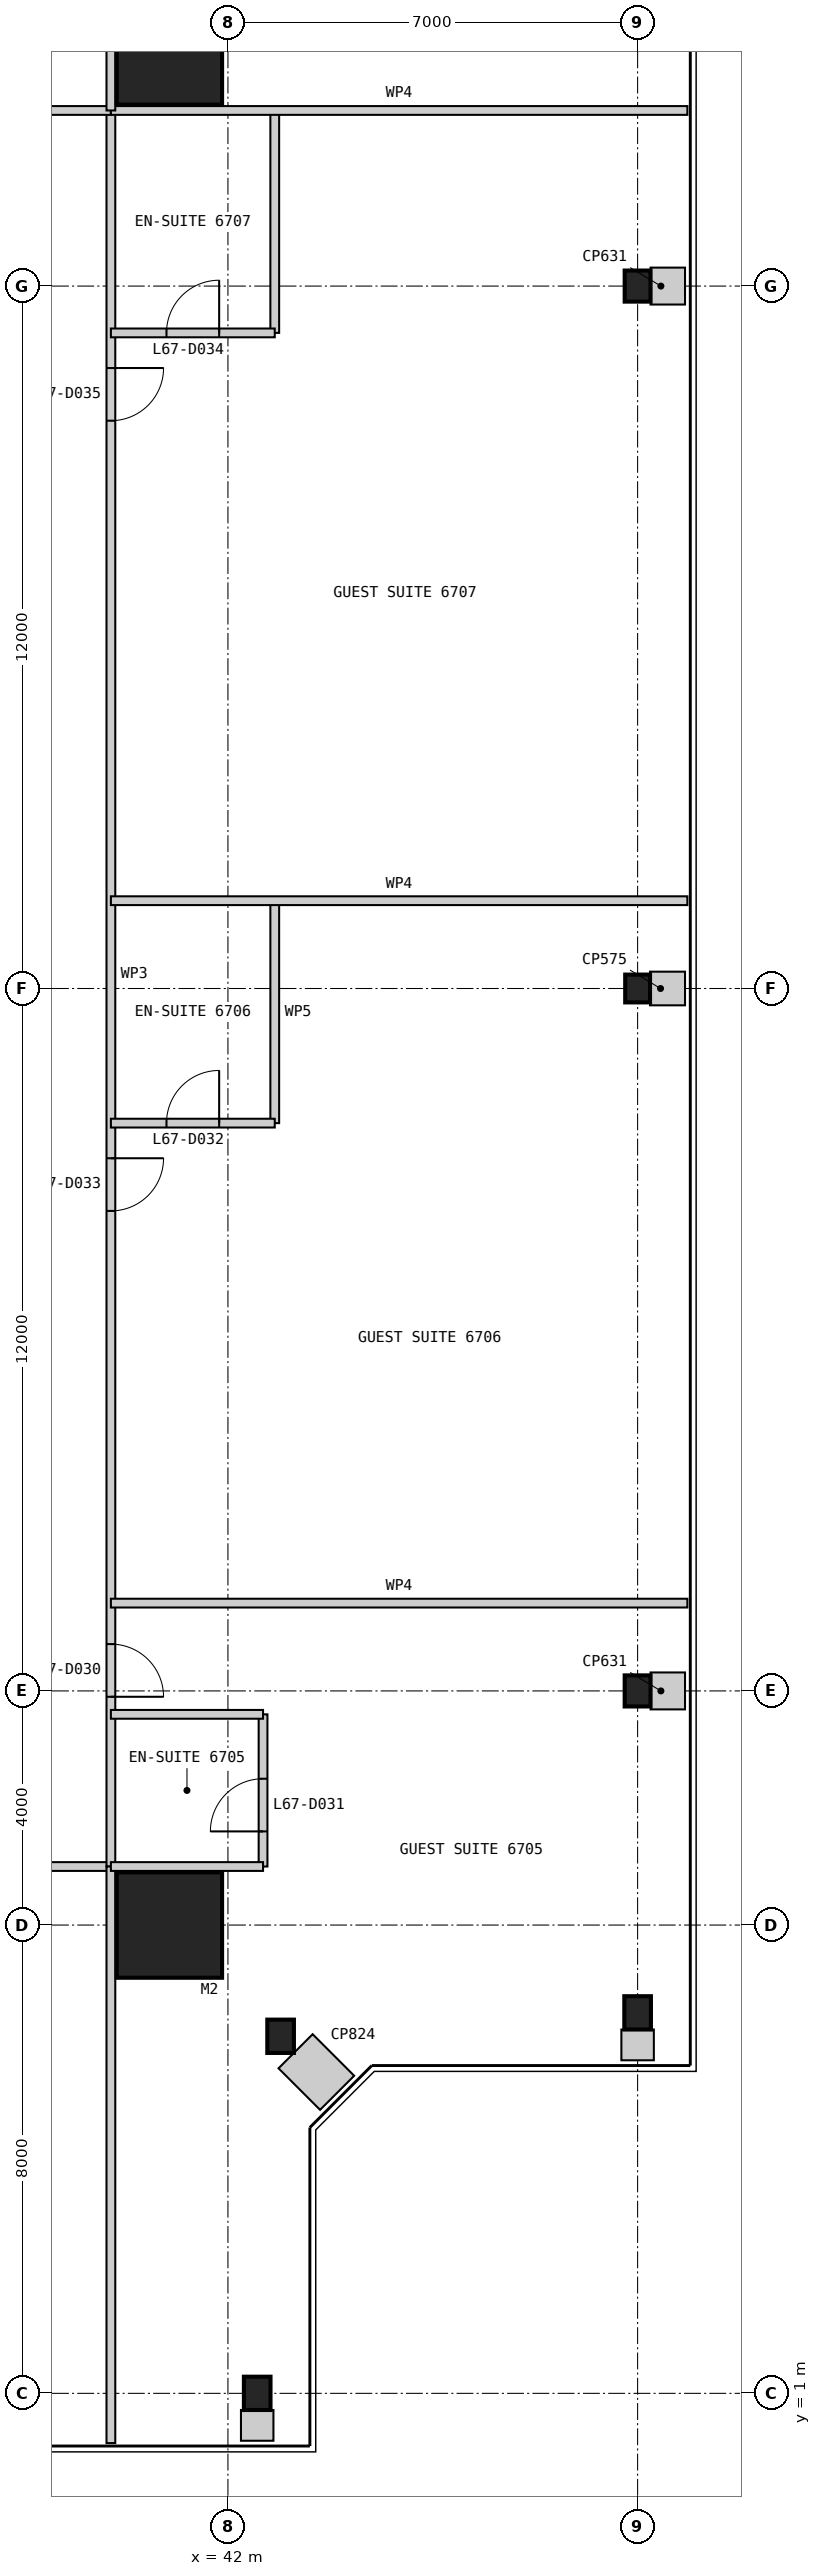
"""IFC4 building model, lengths in metres.
Left out: names, types, materials, properties, quantities, classifications, styles, units other than length and angle.
Written with IfcOpenShell. Run it as: python <this file> out.ifc"""

import sys

from ifc_helpers import new_model, si_unit, direction, frame, frame_2d, origin, origin_2d, place, context, subcontext, project, spatial, rectangle, i_section, extrude, element, fill, save


model = new_model("IFC4")
c1 = context("Model", 3, precision=1e-05, world=origin(), true_north=direction((0.0, 1.0)))
c2 = subcontext(c1, "Body", "Model", "MODEL_VIEW")
j1 = project(units=[si_unit("LENGTHUNIT", "METRE"), si_unit("PLANEANGLEUNIT", "RADIAN")], contexts=[c1])
p1 = place(None, origin())
s1 = spatial("IfcSite", under=j1, at=p1, CompositionType="ELEMENT")
p2 = place(p1, origin())
s2 = spatial("IfcBuilding", under=s1, at=p2, CompositionType="ELEMENT")
p3 = place(p2, frame((0.0, 0.0, 279.8)))
s3 = spatial("IfcBuildingStorey", under=s2, at=p3, CompositionType="ELEMENT", Elevation=279.8)
for number, where, z_axis, x_axis in (
    (1, (41.0, 9.0, 0.0), (0.0, 0.0, 1.0), (1.0, 0.0, 0.0)),
    (2, (41.0, 41.0, 0.0), (0.0, 0.0, 1.0), (1.0, 0.0, 0.0)),
):
    element("IfcColumn", number, at=place(p3, frame(where, z_axis=z_axis, x_axis=x_axis)), inside=s3, PredefinedType="COLUMN", context=c2, shape_type="SweptSolid", body=[
        extrude(rectangle(XDim=1.8, YDim=1.8, at=origin_2d()), origin(), (0.0, 0.0, 1.0), 3.4),
    ])
for number, where, z_axis, x_axis in (
    (3, (42.5, 1.0, 0.0), (0.0, 0.0, 1.0), (1.0, 0.0, 0.0)),
    (4, (42.9, 7.1, 0.0), (0.0, 0.0, 1.0), (1.0, 0.0, 0.0)),
    (5, (49.0, 7.5, 0.0), (0.0, 0.0, 1.0), (1.0, 0.0, 0.0)),
):
    element("IfcColumn", number, at=place(p3, frame(where, z_axis=z_axis, x_axis=x_axis)), inside=s3, PredefinedType="COLUMN", context=c2, shape_type="SweptSolid", body=[
        extrude(i_section(OverallWidth=0.455, OverallDepth=0.569, WebThickness=0.078, FlangeThickness=0.125, at=origin_2d()), origin(), (0.0, 0.0, 1.0), 3.4),
    ])
p4 = place(p3, frame((49.0, 13.0, 0.0), z_axis=(0.0, 0.0, 1.0), x_axis=(1.0, 0.0, 0.0)))
e6 = element("IfcColumn", 6, at=p4, inside=s3, PredefinedType="COLUMN", context=c2, shape_type="SweptSolid", body=[
    extrude(i_section(OverallWidth=0.442, OverallDepth=0.531, WebThickness=0.066, FlangeThickness=0.106, at=origin_2d()), origin(), (0.0, 0.0, 1.0), 3.4),
])
p5 = place(p3, frame((49.0, 25.0, 0.0), z_axis=(0.0, 0.0, 1.0), x_axis=(1.0, 0.0, 0.0)))
e7 = element("IfcColumn", 7, at=p5, inside=s3, PredefinedType="COLUMN", context=c2, shape_type="SweptSolid", body=[
    extrude(i_section(OverallWidth=0.424, OverallDepth=0.475, WebThickness=0.048, FlangeThickness=0.077, at=origin_2d()), origin(), (0.0, 0.0, 1.0), 3.4),
])
p6 = place(p3, frame((49.0, 37.0, 0.0), z_axis=(0.0, 0.0, 1.0), x_axis=(1.0, 0.0, 0.0)))
e8 = element("IfcColumn", 8, at=p6, inside=s3, PredefinedType="COLUMN", context=c2, shape_type="SweptSolid", body=[
    extrude(i_section(OverallWidth=0.442, OverallDepth=0.531, WebThickness=0.066, FlangeThickness=0.106, at=origin_2d()), origin(), (0.0, 0.0, 1.0), 3.4),
])
p7 = place(p3, frame((10.0, 10.0, 0.0), z_axis=(0.0, 0.0, 1.0), x_axis=(1.0, 0.0, 0.0)))
e9 = element("IfcWall", 9, at=p7, inside=s3, PredefinedType="PARTITIONING", context=c2, shape_type="SweptSolid", body=[
    extrude(rectangle(XDim=30.0, YDim=0.15, at=frame_2d((15.0, 0.0))), origin(), (0.0, 0.0, 1.0), 3.25),
])
p8 = place(p7, frame((2.9, 0.0, 0.0)))
e10 = element("IfcOpeningElement", 10, at=p8, cuts=e9, PredefinedType="OPENING", context=c2, shape_type="SweptSolid", body=[
    extrude(rectangle(XDim=0.9, YDim=2.1, at=frame_2d((0.45, 1.05))), frame((0.0, 0.085, 0.0), z_axis=(0.0, -1.0, 0.0), x_axis=(1.0, 0.0, 0.0)), (0.0, 0.0, 1.0), 0.17),
])
p9 = place(p7, frame((11.2, 0.0, 0.0)))
e11 = element("IfcOpeningElement", 11, at=p9, cuts=e9, PredefinedType="OPENING", context=c2, shape_type="SweptSolid", body=[
    extrude(rectangle(XDim=0.9, YDim=2.1, at=frame_2d((0.45, 1.05))), frame((0.0, 0.085, 0.0), z_axis=(0.0, -1.0, 0.0), x_axis=(1.0, 0.0, 0.0)), (0.0, 0.0, 1.0), 0.17),
])
p10 = place(p7, frame((17.6, 0.0, 0.0)))
e12 = element("IfcOpeningElement", 12, at=p10, cuts=e9, PredefinedType="OPENING", context=c2, shape_type="SweptSolid", body=[
    extrude(rectangle(XDim=0.9, YDim=2.1, at=frame_2d((0.45, 1.05))), frame((0.0, 0.085, 0.0), z_axis=(0.0, -1.0, 0.0), x_axis=(1.0, 0.0, 0.0)), (0.0, 0.0, 1.0), 0.17),
])
p11 = place(p7, frame((26.3, 0.0, 0.0)))
e13 = element("IfcOpeningElement", 13, at=p11, cuts=e9, PredefinedType="OPENING", context=c2, shape_type="SweptSolid", body=[
    extrude(rectangle(XDim=1.0, YDim=2.1, at=frame_2d((0.5, 1.05))), frame((0.0, 0.085, 0.0), z_axis=(0.0, -1.0, 0.0), x_axis=(1.0, 0.0, 0.0)), (0.0, 0.0, 1.0), 0.17),
])
p12 = place(p3, frame((40.0, 10.0, 0.0), z_axis=(0.0, 0.0, 1.0), x_axis=(0.0, 1.0, 0.0)))
e14 = element("IfcWall", 14, at=p12, inside=s3, PredefinedType="PARTITIONING", context=c2, shape_type="SweptSolid", body=[
    extrude(rectangle(XDim=30.0, YDim=0.15, at=frame_2d((15.0, 0.0))), origin(), (0.0, 0.0, 1.0), 2.638),
])
p13 = place(p12, frame((2.9, 0.0, 0.0)))
e15 = element("IfcOpeningElement", 15, at=p13, cuts=e14, PredefinedType="OPENING", context=c2, shape_type="SweptSolid", body=[
    extrude(rectangle(XDim=0.9, YDim=2.1, at=frame_2d((0.45, 1.05))), frame((0.0, 0.085, 0.0), z_axis=(0.0, -1.0, 0.0), x_axis=(1.0, 0.0, 0.0)), (0.0, 0.0, 1.0), 0.17),
])
p14 = place(p12, frame((11.2, 0.0, 0.0)))
e16 = element("IfcOpeningElement", 16, at=p14, cuts=e14, PredefinedType="OPENING", context=c2, shape_type="SweptSolid", body=[
    extrude(rectangle(XDim=0.9, YDim=2.1, at=frame_2d((0.45, 1.05))), frame((0.0, 0.085, 0.0), z_axis=(0.0, -1.0, 0.0), x_axis=(1.0, 0.0, 0.0)), (0.0, 0.0, 1.0), 0.17),
])
p15 = place(p12, frame((24.7, 0.0, 0.0)))
e17 = element("IfcOpeningElement", 17, at=p15, cuts=e14, PredefinedType="OPENING", context=c2, shape_type="SweptSolid", body=[
    extrude(rectangle(XDim=0.9, YDim=2.1, at=frame_2d((0.45, 1.05))), frame((0.0, 0.085, 0.0), z_axis=(0.0, -1.0, 0.0), x_axis=(1.0, 0.0, 0.0)), (0.0, 0.0, 1.0), 0.17),
])
p16 = place(p3, frame((40.0, 0.15, 0.0), z_axis=(0.0, 0.0, 1.0), x_axis=(0.0, 1.0, 0.0)))
e18 = element("IfcWall", 18, at=p16, inside=s3, PredefinedType="PARTITIONING", context=c2, shape_type="SweptSolid", body=[
    extrude(rectangle(XDim=9.85, YDim=0.15, at=frame_2d((4.925, 0.0))), origin(), (0.0, 0.0, 1.0), 3.25),
])
p17 = place(p3, frame((42.6, 10.0, 0.0), z_axis=(0.0, 0.0, 1.0), x_axis=(0.0, 1.0, 0.0)))
e19 = element("IfcWall", 19, at=p17, inside=s3, PredefinedType="PARTITIONING", context=c2, shape_type="SweptSolid", body=[
    extrude(rectangle(XDim=2.6, YDim=0.15, at=frame_2d((1.3, 0.0))), origin(), (0.0, 0.0, 1.0), 3.25),
])
p18 = place(p17, frame((0.6, 0.0, 0.0)))
e20 = element("IfcOpeningElement", 20, at=p18, cuts=e19, PredefinedType="OPENING", context=c2, shape_type="SweptSolid", body=[
    extrude(rectangle(XDim=0.9, YDim=2.1, at=frame_2d((0.45, 1.05))), frame((0.0, 0.085, 0.0), z_axis=(0.0, -1.0, 0.0), x_axis=(1.0, 0.0, 0.0)), (0.0, 0.0, 1.0), 0.17),
])
for number, where, z_axis, x_axis in (
    (21, (42.6, 10.0, 0.0), (0.0, 0.0, 1.0), (-1.0, 0.0, 0.0)),
    (22, (42.6, 12.6, 0.0), (0.0, 0.0, 1.0), (-1.0, 0.0, 0.0)),
):
    element("IfcWall", number, at=place(p3, frame(where, z_axis=z_axis, x_axis=x_axis)), inside=s3, PredefinedType="PARTITIONING", context=c2, shape_type="SweptSolid", body=[
        extrude(rectangle(XDim=2.6, YDim=0.15, at=frame_2d((1.3, 0.0))), origin(), (0.0, 0.0, 1.0), 3.25),
    ])
p19 = place(p3, frame((49.85, 14.5, 0.0), z_axis=(0.0, 0.0, 1.0), x_axis=(-1.0, 0.0, 0.0)))
e23 = element("IfcWall", 23, at=p19, inside=s3, PredefinedType="PARTITIONING", context=c2, shape_type="SweptSolid", body=[
    extrude(rectangle(XDim=9.85, YDim=0.15, at=frame_2d((4.925, 0.0))), origin(), (0.0, 0.0, 1.0), 3.25),
])
p20 = place(p3, frame((42.8, 22.7, 0.0), z_axis=(0.0, 0.0, 1.0), x_axis=(0.0, 1.0, 0.0)))
e24 = element("IfcWall", 24, at=p20, inside=s3, PredefinedType="PARTITIONING", context=c2, shape_type="SweptSolid", body=[
    extrude(rectangle(XDim=3.8, YDim=0.15, at=frame_2d((1.9, 0.0))), origin(), (0.0, 0.0, 1.0), 3.25),
])
p21 = place(p3, frame((42.8, 22.7, 0.0), z_axis=(0.0, 0.0, 1.0), x_axis=(-1.0, 0.0, 0.0)))
e25 = element("IfcWall", 25, at=p21, inside=s3, PredefinedType="PARTITIONING", context=c2, shape_type="SweptSolid", body=[
    extrude(rectangle(XDim=2.8, YDim=0.15, at=frame_2d((1.4, 0.0))), origin(), (0.0, 0.0, 1.0), 3.25),
])
p22 = place(p21, frame((0.95, 0.0, 0.0)))
e26 = element("IfcOpeningElement", 26, at=p22, cuts=e25, PredefinedType="OPENING", context=c2, shape_type="SweptSolid", body=[
    extrude(rectangle(XDim=0.9, YDim=2.1, at=frame_2d((0.45, 1.05))), frame((0.0, 0.085, 0.0), z_axis=(0.0, -1.0, 0.0), x_axis=(1.0, 0.0, 0.0)), (0.0, 0.0, 1.0), 0.17),
])
p23 = place(p3, frame((49.85, 26.5, 0.0), z_axis=(0.0, 0.0, 1.0), x_axis=(-1.0, 0.0, 0.0)))
e27 = element("IfcWall", 27, at=p23, inside=s3, PredefinedType="PARTITIONING", context=c2, shape_type="SweptSolid", body=[
    extrude(rectangle(XDim=9.85, YDim=0.15, at=frame_2d((4.925, 0.0))), origin(), (0.0, 0.0, 1.0), 3.25),
])
p24 = place(p3, frame((42.8, 36.2, 0.0), z_axis=(0.0, 0.0, 1.0), x_axis=(0.0, 1.0, 0.0)))
e28 = element("IfcWall", 28, at=p24, inside=s3, PredefinedType="PARTITIONING", context=c2, shape_type="SweptSolid", body=[
    extrude(rectangle(XDim=3.8, YDim=0.15, at=frame_2d((1.9, 0.0))), origin(), (0.0, 0.0, 1.0), 3.25),
])
p25 = place(p3, frame((42.8, 36.2, 0.0), z_axis=(0.0, 0.0, 1.0), x_axis=(-1.0, 0.0, 0.0)))
e29 = element("IfcWall", 29, at=p25, inside=s3, PredefinedType="PARTITIONING", context=c2, shape_type="SweptSolid", body=[
    extrude(rectangle(XDim=2.8, YDim=0.15, at=frame_2d((1.4, 0.0))), origin(), (0.0, 0.0, 1.0), 3.25),
])
p26 = place(p25, frame((0.95, 0.0, 0.0)))
e30 = element("IfcOpeningElement", 30, at=p26, cuts=e29, PredefinedType="OPENING", context=c2, shape_type="SweptSolid", body=[
    extrude(rectangle(XDim=0.9, YDim=2.1, at=frame_2d((0.45, 1.05))), frame((0.0, 0.085, 0.0), z_axis=(0.0, -1.0, 0.0), x_axis=(1.0, 0.0, 0.0)), (0.0, 0.0, 1.0), 0.17),
])
p27 = place(p3, frame((40.0, 40.0, 0.0), z_axis=(0.0, 0.0, 1.0), x_axis=(-1.0, 0.0, 0.0)))
e31 = element("IfcWall", 31, at=p27, inside=s3, PredefinedType="PARTITIONING", context=c2, shape_type="SweptSolid", body=[
    extrude(rectangle(XDim=30.0, YDim=0.15, at=frame_2d((15.0, 0.0))), origin(), (0.0, 0.0, 1.0), 3.25),
])
p28 = place(p27, frame((2.9, 0.0, 0.0)))
e32 = element("IfcOpeningElement", 32, at=p28, cuts=e31, PredefinedType="OPENING", context=c2, shape_type="SweptSolid", body=[
    extrude(rectangle(XDim=0.9, YDim=2.1, at=frame_2d((0.45, 1.05))), frame((0.0, 0.085, 0.0), z_axis=(0.0, -1.0, 0.0), x_axis=(1.0, 0.0, 0.0)), (0.0, 0.0, 1.0), 0.17),
])
p29 = place(p27, frame((11.2, 0.0, 0.0)))
e33 = element("IfcOpeningElement", 33, at=p29, cuts=e31, PredefinedType="OPENING", context=c2, shape_type="SweptSolid", body=[
    extrude(rectangle(XDim=0.9, YDim=2.1, at=frame_2d((0.45, 1.05))), frame((0.0, 0.085, 0.0), z_axis=(0.0, -1.0, 0.0), x_axis=(1.0, 0.0, 0.0)), (0.0, 0.0, 1.0), 0.17),
])
p30 = place(p27, frame((24.7, 0.0, 0.0)))
e34 = element("IfcOpeningElement", 34, at=p30, cuts=e31, PredefinedType="OPENING", context=c2, shape_type="SweptSolid", body=[
    extrude(rectangle(XDim=0.9, YDim=2.1, at=frame_2d((0.45, 1.05))), frame((0.0, 0.085, 0.0), z_axis=(0.0, -1.0, 0.0), x_axis=(1.0, 0.0, 0.0)), (0.0, 0.0, 1.0), 0.17),
])
p31 = place(p3, frame((49.85, 40.0, 0.0), z_axis=(0.0, 0.0, 1.0), x_axis=(-1.0, 0.0, 0.0)))
e35 = element("IfcWall", 35, at=p31, inside=s3, PredefinedType="PARTITIONING", context=c2, shape_type="SweptSolid", body=[
    extrude(rectangle(XDim=9.85, YDim=0.15, at=frame_2d((4.925, 0.0))), origin(), (0.0, 0.0, 1.0), 3.25),
])
p32 = place(p3, frame((40.0, 42.6, 0.0), z_axis=(0.0, 0.0, 1.0), x_axis=(0.0, -1.0, 0.0)))
e36 = element("IfcWall", 36, at=p32, inside=s3, PredefinedType="PARTITIONING", context=c2, shape_type="SweptSolid", body=[
    extrude(rectangle(XDim=2.6, YDim=0.15, at=frame_2d((1.3, 0.0))), origin(), (0.0, 0.0, 1.0), 3.25),
])
p33 = place(p3, frame((42.5, 0.19, 0.0), z_axis=(0.0, 0.0, 1.0), x_axis=(0.0, 1.0, 0.0)))
e37 = element("IfcWall", 37, at=p33, inside=s3, PredefinedType="PARTITIONING", context=c2, shape_type="SweptSolid", body=[
    extrude(rectangle(XDim=0.526, YDim=0.555, at=frame_2d((0.263, 0.0))), origin(), (0.0, 0.0, 1.0), 3.25),
])
p34 = place(p3, frame((43.866, 6.134, 0.0), z_axis=(0.0, 0.0, 1.0), x_axis=(-0.707106781187, 0.707106781187, 0.0)))
e38 = element("IfcWall", 38, at=p34, inside=s3, PredefinedType="PARTITIONING", context=c2, shape_type="SweptSolid", body=[
    extrude(rectangle(XDim=1.004, YDim=0.824, at=frame_2d((0.502, 0.0))), origin(), (0.0, 0.0, 1.0), 3.25),
])
p35 = place(p3, frame((49.0, 6.69, 0.0), z_axis=(0.0, 0.0, 1.0), x_axis=(0.0, 1.0, 0.0)))
e39 = element("IfcWall", 39, at=p35, inside=s3, PredefinedType="PARTITIONING", context=c2, shape_type="SweptSolid", body=[
    extrude(rectangle(XDim=0.526, YDim=0.555, at=frame_2d((0.263, 0.0))), origin(), (0.0, 0.0, 1.0), 3.25),
])
p36 = place(p3, frame((49.81, 13.0, 0.0), z_axis=(0.0, 0.0, 1.0), x_axis=(-1.0, 0.0, 0.0)))
e40 = element("IfcWall", 40, at=p36, inside=s3, PredefinedType="PARTITIONING", context=c2, shape_type="SweptSolid", body=[
    extrude(rectangle(XDim=0.589, YDim=0.631, at=frame_2d((0.294, 0.0))), origin(), (0.0, 0.0, 1.0), 3.25),
])
p37 = place(p3, frame((49.81, 25.0, 0.0), z_axis=(0.0, 0.0, 1.0), x_axis=(-1.0, 0.0, 0.0)))
e41 = element("IfcWall", 41, at=p37, inside=s3, PredefinedType="PARTITIONING", context=c2, shape_type="SweptSolid", body=[
    extrude(rectangle(XDim=0.598, YDim=0.575, at=frame_2d((0.299, 0.0))), origin(), (0.0, 0.0, 1.0), 3.25),
])
p38 = place(p3, frame((49.81, 37.0, 0.0), z_axis=(0.0, 0.0, 1.0), x_axis=(-1.0, 0.0, 0.0)))
e42 = element("IfcWall", 42, at=p38, inside=s3, PredefinedType="PARTITIONING", context=c2, shape_type="SweptSolid", body=[
    extrude(rectangle(XDim=0.589, YDim=0.631, at=frame_2d((0.294, 0.0))), origin(), (0.0, 0.0, 1.0), 3.25),
])
p39 = place(p13, frame((0.9, 0.0, 0.0), z_axis=(0.0, 0.0, 1.0), x_axis=(-1.0, 0.0, 0.0)))
e43 = element("IfcDoor", 43, at=p39, inside=s3, OperationType="SINGLE_SWING_RIGHT", PredefinedType="DOOR", context=c2, shape_type="SweptSolid", body=[
    extrude(rectangle(XDim=0.9, YDim=2.1, at=frame_2d((0.45, 1.05))), frame((0.0, 0.025, 0.0), z_axis=(0.0, -1.0, 0.0), x_axis=(1.0, 0.0, 0.0)), (0.0, 0.0, 1.0), 0.05),
])
fill(e15, e43)
p40 = place(p18, origin())
e44 = element("IfcDoor", 44, at=p40, inside=s3, OperationType="SINGLE_SWING_LEFT", PredefinedType="DOOR", context=c2, shape_type="SweptSolid", body=[
    extrude(rectangle(XDim=0.9, YDim=2.1, at=frame_2d((0.45, 1.05))), frame((0.0, 0.025, 0.0), z_axis=(0.0, -1.0, 0.0), x_axis=(1.0, 0.0, 0.0)), (0.0, 0.0, 1.0), 0.05),
])
fill(e20, e44)
p41 = place(p22, frame((0.9, 0.0, 0.0), z_axis=(0.0, 0.0, 1.0), x_axis=(-1.0, 0.0, 0.0)))
e45 = element("IfcDoor", 45, at=p41, inside=s3, OperationType="SINGLE_SWING_RIGHT", PredefinedType="DOOR", context=c2, shape_type="SweptSolid", body=[
    extrude(rectangle(XDim=0.9, YDim=2.1, at=frame_2d((0.45, 1.05))), frame((0.0, 0.025, 0.0), z_axis=(0.0, -1.0, 0.0), x_axis=(1.0, 0.0, 0.0)), (0.0, 0.0, 1.0), 0.05),
])
fill(e26, e45)
p42 = place(p14, frame((0.9, 0.0, 0.0), z_axis=(0.0, 0.0, 1.0), x_axis=(-1.0, 0.0, 0.0)))
e46 = element("IfcDoor", 46, at=p42, inside=s3, OperationType="SINGLE_SWING_LEFT", PredefinedType="DOOR", context=c2, shape_type="SweptSolid", body=[
    extrude(rectangle(XDim=0.9, YDim=2.1, at=frame_2d((0.45, 1.05))), frame((0.0, 0.025, 0.0), z_axis=(0.0, -1.0, 0.0), x_axis=(1.0, 0.0, 0.0)), (0.0, 0.0, 1.0), 0.05),
])
fill(e16, e46)
p43 = place(p26, frame((0.9, 0.0, 0.0), z_axis=(0.0, 0.0, 1.0), x_axis=(-1.0, 0.0, 0.0)))
e47 = element("IfcDoor", 47, at=p43, inside=s3, OperationType="SINGLE_SWING_RIGHT", PredefinedType="DOOR", context=c2, shape_type="SweptSolid", body=[
    extrude(rectangle(XDim=0.9, YDim=2.1, at=frame_2d((0.45, 1.05))), frame((0.0, 0.025, 0.0), z_axis=(0.0, -1.0, 0.0), x_axis=(1.0, 0.0, 0.0)), (0.0, 0.0, 1.0), 0.05),
])
fill(e30, e47)
p44 = place(p15, frame((0.9, 0.0, 0.0), z_axis=(0.0, 0.0, 1.0), x_axis=(-1.0, 0.0, 0.0)))
e48 = element("IfcDoor", 48, at=p44, inside=s3, OperationType="SINGLE_SWING_LEFT", PredefinedType="DOOR", context=c2, shape_type="SweptSolid", body=[
    extrude(rectangle(XDim=0.9, YDim=2.1, at=frame_2d((0.45, 1.05))), frame((0.0, 0.025, 0.0), z_axis=(0.0, -1.0, 0.0), x_axis=(1.0, 0.0, 0.0)), (0.0, 0.0, 1.0), 0.05),
])
fill(e17, e48)
save(model, sys.argv[1])
